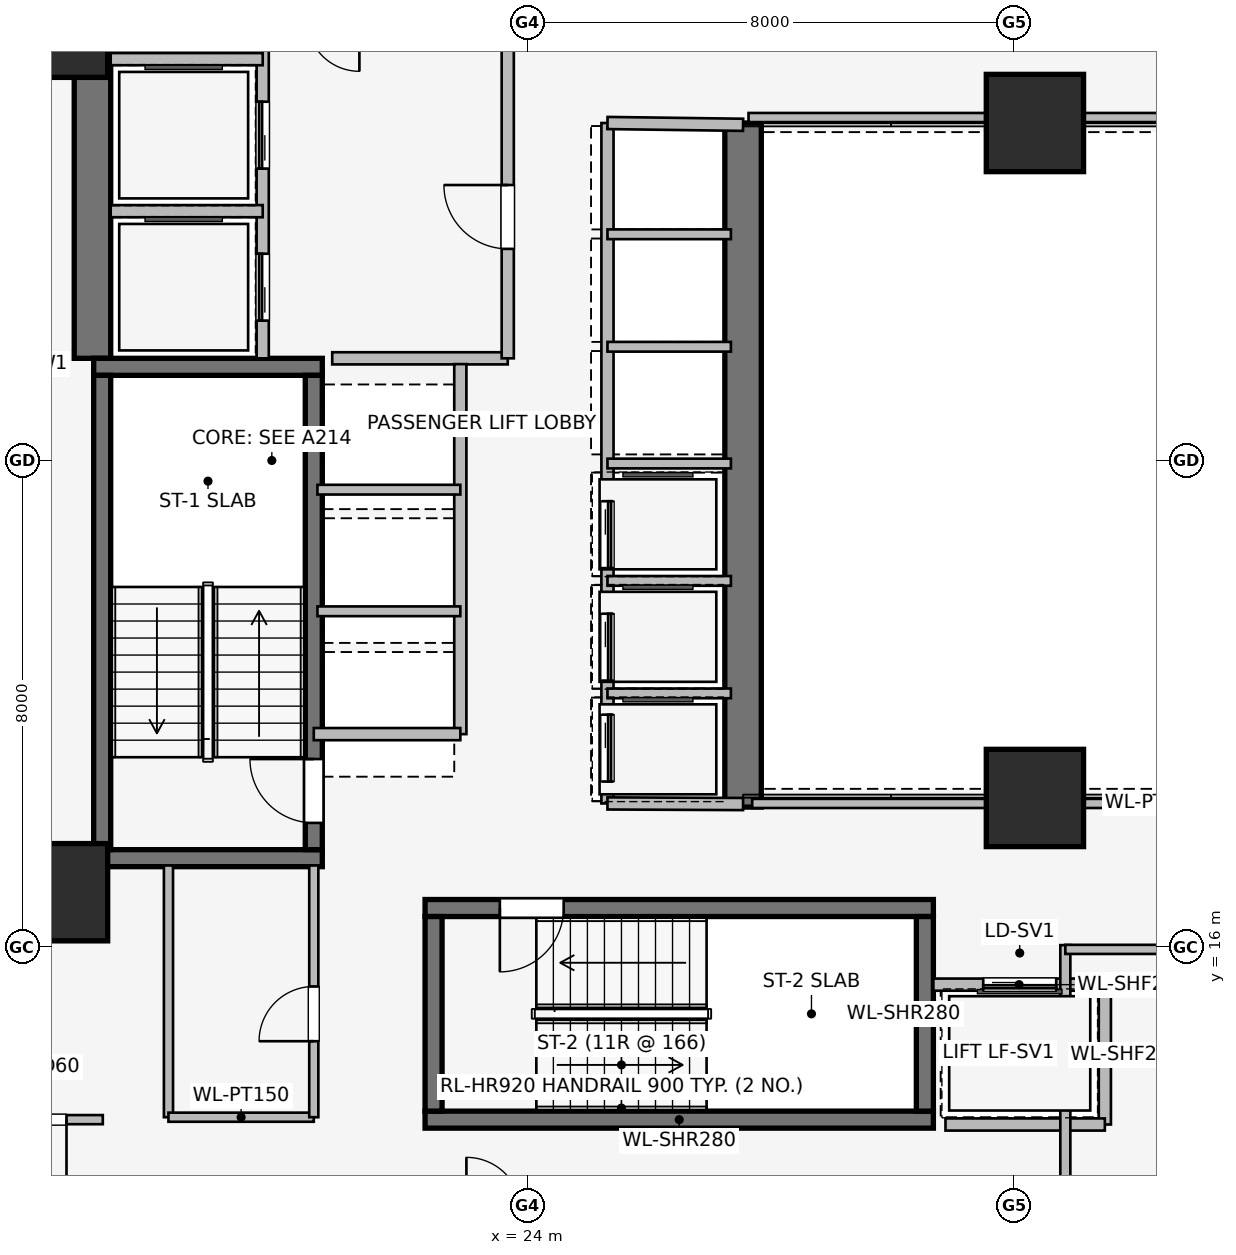
"""IFC4 building model, lengths in metres.
Left out: names, types, materials, properties, quantities, classifications, styles, units other than length and angle.
Written with IfcOpenShell. Run it as: python <this file> out.ifc"""

import sys

from ifc_helpers import new_model, si_unit, direction, frame, frame_2d, origin, origin_2d, place, context, subcontext, project, spatial, rectangle, extrude, element, fill, save


model = new_model("IFC4")
c1 = context("Model", 3, precision=1e-05, world=origin(), true_north=direction((0.0, 1.0)))
c2 = subcontext(c1, "Body", "Model", "MODEL_VIEW")
j1 = project(units=[si_unit("LENGTHUNIT", "METRE"), si_unit("PLANEANGLEUNIT", "RADIAN")], contexts=[c1])
p1 = place(None, origin())
s1 = spatial("IfcSite", under=j1, at=p1, CompositionType="ELEMENT")
p2 = place(p1, origin())
s2 = spatial("IfcBuilding", under=s1, at=p2, CompositionType="ELEMENT")
p3 = place(p2, frame((0.0, 0.0, 48.9)))
s3 = spatial("IfcBuildingStorey", under=s2, at=p3, CompositionType="ELEMENT", Elevation=48.9)
p4 = place(p3, frame((16.85, 25.68, 0.0), z_axis=(0.0, 0.0, 1.0), x_axis=(0.0, 1.0, 0.0)))
e1 = element("IfcWall", 1, at=p4, inside=s3, PredefinedType="SHEAR", context=c2, shape_type="SweptSolid", body=[
    extrude(rectangle(XDim=5.62, YDim=0.6, at=frame_2d((2.81, 0.0))), origin(), (0.0, 0.0, 1.0), 3.65),
])
p5 = place(p3, frame((27.55, 29.55, 0.0), z_axis=(0.0, 0.0, 1.0), x_axis=(0.0, -1.0, 0.0)))
e2 = element("IfcWall", 2, at=p5, inside=s3, PredefinedType="SHEAR", context=c2, shape_type="SweptSolid", body=[
    extrude(rectangle(XDim=11.25, YDim=0.6, at=frame_2d((5.625, 0.0))), origin(), (0.0, 0.0, 1.0), 3.65),
])
for number, where, z_axis, x_axis in (
    (3, (16.87, 17.46, 0.0), (0.0, 0.0, 1.0), (1.0, 0.0, 0.0)),
    (4, (20.63, 25.54, 0.0), (0.0, 0.0, 1.0), (-1.0, 0.0, 0.0)),
):
    element("IfcWall", number, at=place(p3, frame(where, z_axis=z_axis, x_axis=x_axis)), inside=s3, PredefinedType="SHEAR", context=c2, shape_type="SweptSolid", body=[
        extrude(rectangle(XDim=3.76, YDim=0.28, at=frame_2d((1.88, 0.0))), origin(), (0.0, 0.0, 1.0), 3.65),
    ])
p6 = place(p3, frame((17.01, 25.4, 0.0), z_axis=(0.0, 0.0, 1.0), x_axis=(0.0, -1.0, 0.0)))
e5 = element("IfcWall", 5, at=p6, inside=s3, PredefinedType="SHEAR", context=c2, shape_type="SweptSolid", body=[
    extrude(rectangle(XDim=7.8, YDim=0.28, at=frame_2d((3.9, 0.0))), origin(), (0.0, 0.0, 1.0), 3.65),
])
p7 = place(p3, frame((20.49, 17.6, 0.0), z_axis=(0.0, 0.0, 1.0), x_axis=(0.0, 1.0, 0.0)))
e6 = element("IfcWall", 6, at=p7, inside=s3, PredefinedType="SHEAR", context=c2, shape_type="SweptSolid", body=[
    extrude(rectangle(XDim=7.8, YDim=0.28, at=frame_2d((3.9, 0.0))), origin(), (0.0, 0.0, 1.0), 3.65),
])
p8 = place(p7, frame((0.44, 0.0, 0.0)))
e7 = element("IfcOpeningElement", 7, at=p8, cuts=e6, PredefinedType="OPENING", context=c2, shape_type="SweptSolid", body=[
    extrude(rectangle(XDim=1.05, YDim=2.0, at=frame_2d((0.525, 1.0))), frame((0.0, 0.15, 0.0), z_axis=(0.0, -1.0, 0.0), x_axis=(1.0, 0.0, 0.0)), (0.0, 0.0, 1.0), 0.3),
])
p9 = place(p3, frame((22.32, 13.16, 0.0), z_axis=(0.0, 0.0, 1.0), x_axis=(1.0, 0.0, 0.0)))
e8 = element("IfcWall", 8, at=p9, inside=s3, PredefinedType="SHEAR", context=c2, shape_type="SweptSolid", body=[
    extrude(rectangle(XDim=8.36, YDim=0.28, at=frame_2d((4.18, 0.0))), origin(), (0.0, 0.0, 1.0), 3.65),
])
p10 = place(p3, frame((30.68, 16.64, 0.0), z_axis=(0.0, 0.0, 1.0), x_axis=(-1.0, 0.0, 0.0)))
e9 = element("IfcWall", 9, at=p10, inside=s3, PredefinedType="SHEAR", context=c2, shape_type="SweptSolid", body=[
    extrude(rectangle(XDim=8.36, YDim=0.28, at=frame_2d((4.18, 0.0))), origin(), (0.0, 0.0, 1.0), 3.65),
])
p11 = place(p10, frame((6.08, 0.0, 0.0)))
e10 = element("IfcOpeningElement", 10, at=p11, cuts=e9, PredefinedType="OPENING", context=c2, shape_type="SweptSolid", body=[
    extrude(rectangle(XDim=1.05, YDim=2.0, at=frame_2d((0.525, 1.0))), frame((0.0, 0.15, 0.0), z_axis=(0.0, -1.0, 0.0), x_axis=(1.0, 0.0, 0.0)), (0.0, 0.0, 1.0), 0.3),
])
for number, where, z_axis, x_axis in (
    (11, (22.46, 16.5, 0.0), (0.0, 0.0, 1.0), (0.0, -1.0, 0.0)),
    (12, (30.54, 13.3, 0.0), (0.0, 0.0, 1.0), (0.0, 1.0, 0.0)),
):
    element("IfcWall", number, at=place(p3, frame(where, z_axis=z_axis, x_axis=x_axis)), inside=s3, PredefinedType="SHEAR", context=c2, shape_type="SweptSolid", body=[
        extrude(rectangle(XDim=3.2, YDim=0.28, at=frame_2d((1.6, 0.0))), origin(), (0.0, 0.0, 1.0), 3.65),
    ])
for number, where, z_axis, x_axis in (
    (13, (16.3, 16.9, 0.0), (0.0, 0.0, 1.0), (1.0, 0.0, 0.0)),
    (14, (16.3, 31.1, 0.0), (0.0, 0.0, 1.0), (1.0, 0.0, 0.0)),
    (15, (32.35, 18.45, 0.0), (0.0, 0.0, 1.0), (1.0, 0.0, 0.0)),
    (16, (32.35, 29.55, 0.0), (0.0, 0.0, 1.0), (1.0, 0.0, 0.0)),
):
    element("IfcColumn", number, at=place(p3, frame(where, z_axis=z_axis, x_axis=x_axis)), inside=s3, PredefinedType="COLUMN", context=c2, shape_type="SweptSolid", body=[
        extrude(rectangle(XDim=1.6, YDim=1.6, at=origin_2d()), origin(), (0.0, 0.0, 1.0), 3.65),
    ])
p12 = place(p3, frame((16.998, 11.099, 0.0), z_axis=(0.0, 0.0, 1.0), x_axis=(-0.790691856293, 0.61221433207, 0.0)))
e17 = element("IfcWall", 17, at=p12, inside=s3, PredefinedType="STANDARD", context=c2, shape_type="SweptSolid", body=[
    extrude(rectangle(XDim=1.676, YDim=0.33, at=frame_2d((0.838, 0.0))), origin(), (0.0, 0.0, 1.0), 3.36),
])
p13 = place(p3, frame((19.65, 25.68, 0.0), z_axis=(0.0, 0.0, 1.0), x_axis=(0.0, 1.0, 0.0)))
e18 = element("IfcWall", 18, at=p13, inside=s3, PredefinedType="PARTITIONING", context=c2, shape_type="SweptSolid", body=[
    extrude(rectangle(XDim=5.54, YDim=0.2, at=frame_2d((2.77, 0.0))), origin(), (0.0, 0.0, 1.0), 3.36),
])
p14 = place(p13, frame((0.62, 0.0, 0.0)))
e19 = element("IfcOpeningElement", 19, at=p14, cuts=e18, PredefinedType="OPENING", context=c2, shape_type="SweptSolid", body=[
    extrude(rectangle(XDim=1.1, YDim=2.2, at=frame_2d((0.55, 1.1))), frame((0.0, 0.11, 0.0), z_axis=(0.0, -1.0, 0.0), x_axis=(1.0, 0.0, 0.0)), (0.0, 0.0, 1.0), 0.22),
])
p15 = place(p13, frame((3.12, 0.0, 0.0)))
e20 = element("IfcOpeningElement", 20, at=p15, cuts=e18, PredefinedType="OPENING", context=c2, shape_type="SweptSolid", body=[
    extrude(rectangle(XDim=1.1, YDim=2.2, at=frame_2d((0.55, 1.1))), frame((0.0, 0.11, 0.0), z_axis=(0.0, -1.0, 0.0), x_axis=(1.0, 0.0, 0.0)), (0.0, 0.0, 1.0), 0.22),
])
p16 = place(p3, frame((20.793, 25.68, 0.0), z_axis=(0.0, 0.0, 1.0), x_axis=(1.0, 0.0, 0.0)))
e21 = element("IfcWall", 21, at=p16, inside=s3, PredefinedType="PARTITIONING", context=c2, shape_type="SweptSolid", body=[
    extrude(rectangle(XDim=2.887, YDim=0.2, at=frame_2d((1.443, 0.0))), origin(), (0.0, 0.0, 1.0), 3.36),
])
p17 = place(p3, frame((23.68, 25.68, 0.0), z_axis=(0.0, 0.0, 1.0), x_axis=(0.0, 1.0, 0.0)))
e22 = element("IfcWall", 22, at=p17, inside=s3, PredefinedType="PARTITIONING", context=c2, shape_type="SweptSolid", body=[
    extrude(rectangle(XDim=5.54, YDim=0.2, at=frame_2d((2.77, 0.0))), origin(), (0.0, 0.0, 1.0), 3.36),
])
p18 = place(p17, frame((1.8, 0.0, 0.0)))
e23 = element("IfcOpeningElement", 23, at=p18, cuts=e22, PredefinedType="OPENING", context=c2, shape_type="SweptSolid", body=[
    extrude(rectangle(XDim=1.05, YDim=2.0, at=frame_2d((0.525, 1.0))), frame((0.0, 0.11, 0.0), z_axis=(0.0, -1.0, 0.0), x_axis=(1.0, 0.0, 0.0)), (0.0, 0.0, 1.0), 0.22),
])
p19 = place(p3, frame((17.15, 28.1, 0.0), z_axis=(0.0, 0.0, 1.0), x_axis=(1.0, 0.0, 0.0)))
e24 = element("IfcWall", 24, at=p19, inside=s3, PredefinedType="PARTITIONING", context=c2, shape_type="SweptSolid", body=[
    extrude(rectangle(XDim=2.5, YDim=0.2, at=frame_2d((1.25, 0.0))), origin(), (0.0, 0.0, 1.0), 3.36),
])
p20 = place(p3, frame((19.65, 30.6, 0.0), z_axis=(0.0, 0.0, 1.0), x_axis=(-1.0, 0.0, 0.0)))
e25 = element("IfcWall", 25, at=p20, inside=s3, PredefinedType="PARTITIONING", context=c2, shape_type="SweptSolid", body=[
    extrude(rectangle(XDim=2.5, YDim=0.2, at=frame_2d((1.25, 0.0))), origin(), (0.0, 0.0, 1.0), 2.26),
])
p21 = place(p3, frame((33.5, 15.38, 0.0), z_axis=(0.0, 0.0, 1.0), x_axis=(-1.0, 0.0, 0.0)))
e26 = element("IfcWall", 26, at=p21, inside=s3, PredefinedType="PARTITIONING", context=c2, shape_type="SweptSolid", body=[
    extrude(rectangle(XDim=2.82, YDim=0.2, at=frame_2d((1.41, 0.0))), origin(), (0.0, 0.0, 1.0), 3.36),
])
p22 = place(p21, frame((0.8, 0.0, 0.0)))
e27 = element("IfcOpeningElement", 27, at=p22, cuts=e26, PredefinedType="OPENING", context=c2, shape_type="SweptSolid", body=[
    extrude(rectangle(XDim=1.2, YDim=2.2, at=frame_2d((0.6, 1.1))), frame((0.0, 0.11, 0.0), z_axis=(0.0, -1.0, 0.0), x_axis=(1.0, 0.0, 0.0)), (0.0, 0.0, 1.0), 0.22),
])
p23 = place(p3, frame((33.5, 13.08, 0.0), z_axis=(0.0, 0.0, 1.0), x_axis=(0.0, 1.0, 0.0)))
e28 = element("IfcWall", 28, at=p23, inside=s3, PredefinedType="PARTITIONING", context=c2, shape_type="SweptSolid", body=[
    extrude(rectangle(XDim=2.3, YDim=0.2, at=frame_2d((1.15, 0.0))), origin(), (0.0, 0.0, 1.0), 3.36),
])
p24 = place(p3, frame((30.879, 13.08, 0.0), z_axis=(0.0, 0.0, 1.0), x_axis=(1.0, 0.0, 0.0)))
e29 = element("IfcWall", 29, at=p24, inside=s3, PredefinedType="PARTITIONING", context=c2, shape_type="SweptSolid", body=[
    extrude(rectangle(XDim=2.621, YDim=0.2, at=frame_2d((1.311, 0.0))), origin(), (0.0, 0.0, 1.0), 3.36),
])
p25 = place(p3, frame((22.9, 19.5, 0.0), z_axis=(0.0, 0.0, 1.0), x_axis=(0.0, 1.0, 0.0)))
e30 = element("IfcWall", 30, at=p25, inside=s3, PredefinedType="PARTITIONING", context=c2, shape_type="SweptSolid", body=[
    extrude(rectangle(XDim=6.085, YDim=0.2, at=frame_2d((3.042, 0.0))), origin(), (0.0, 0.0, 1.0), 3.36),
])
p26 = place(p3, frame((20.49, 19.5, 0.0), z_axis=(0.0, 0.0, 1.0), x_axis=(1.0, 0.0, 0.0)))
e31 = element("IfcWall", 31, at=p26, inside=s3, PredefinedType="PARTITIONING", context=c2, shape_type="SweptSolid", body=[
    extrude(rectangle(XDim=2.41, YDim=0.2, at=frame_2d((1.205, 0.0))), origin(), (0.0, 0.0, 1.0), 2.26),
])
for number, where, z_axis, x_axis in (
    (32, (20.55, 21.52, 0.0), (0.0, 0.0, 1.0), (1.0, 0.0, 0.0)),
    (33, (20.55, 23.52, 0.0), (0.0, 0.0, 1.0), (1.0, 0.0, 0.0)),
):
    element("IfcWall", number, at=place(p3, frame(where, z_axis=z_axis, x_axis=x_axis)), inside=s3, PredefinedType="PARTITIONING", context=c2, shape_type="SweptSolid", body=[
        extrude(rectangle(XDim=2.35, YDim=0.16, at=frame_2d((1.175, 0.0))), origin(), (0.0, 0.0, 1.0), 3.36),
    ])
p27 = place(p3, frame((25.32, 29.55, 0.0), z_axis=(0.0, 0.0, 1.0), x_axis=(0.0, -1.0, 0.0)))
e34 = element("IfcWall", 34, at=p27, inside=s3, PredefinedType="PARTITIONING", context=c2, shape_type="SweptSolid", body=[
    extrude(rectangle(XDim=11.19, YDim=0.2, at=frame_2d((5.595, 0.0))), origin(), (0.0, 0.0, 1.0), 3.36),
])
p28 = place(p27, frame((6.22, 0.0, 0.0)))
e35 = element("IfcOpeningElement", 35, at=p28, cuts=e34, PredefinedType="OPENING", context=c2, shape_type="SweptSolid", body=[
    extrude(rectangle(XDim=1.1, YDim=2.2, at=frame_2d((0.55, 1.1))), frame((0.0, 0.11, 0.0), z_axis=(0.0, -1.0, 0.0), x_axis=(1.0, 0.0, 0.0)), (0.0, 0.0, 1.0), 0.22),
])
p29 = place(p27, frame((8.07, 0.0, 0.0)))
e36 = element("IfcOpeningElement", 36, at=p29, cuts=e34, PredefinedType="OPENING", context=c2, shape_type="SweptSolid", body=[
    extrude(rectangle(XDim=1.1, YDim=2.2, at=frame_2d((0.55, 1.1))), frame((0.0, 0.11, 0.0), z_axis=(0.0, -1.0, 0.0), x_axis=(1.0, 0.0, 0.0)), (0.0, 0.0, 1.0), 0.22),
])
p30 = place(p27, frame((9.73, 0.0, 0.0)))
e37 = element("IfcOpeningElement", 37, at=p30, cuts=e34, PredefinedType="OPENING", context=c2, shape_type="SweptSolid", body=[
    extrude(rectangle(XDim=1.1, YDim=2.2, at=frame_2d((0.55, 1.1))), frame((0.0, 0.11, 0.0), z_axis=(0.0, -1.0, 0.0), x_axis=(1.0, 0.0, 0.0)), (0.0, 0.0, 1.0), 0.22),
])
p31 = place(p3, frame((25.32, 18.36, 0.0), z_axis=(0.0, 0.0, 1.0), x_axis=(0.999989925833, -0.004488678231, 0.0)))
e38 = element("IfcWall", 38, at=p31, inside=s3, PredefinedType="PARTITIONING", context=c2, shape_type="SweptSolid", body=[
    extrude(rectangle(XDim=2.23, YDim=0.2, at=frame_2d((1.115, 0.0))), origin(), (0.0, 0.0, 1.0), 3.36),
])
p32 = place(p3, frame((27.55, 29.52, 0.0), z_axis=(0.0, 0.0, 1.0), x_axis=(-0.999909343457, 0.013464949556, 0.0)))
e39 = element("IfcWall", 39, at=p32, inside=s3, PredefinedType="PARTITIONING", context=c2, shape_type="SweptSolid", body=[
    extrude(rectangle(XDim=2.23, YDim=0.2, at=frame_2d((1.115, 0.0))), origin(), (0.0, 0.0, 1.0), 2.26),
])
for number, where, z_axis, x_axis in (
    (40, (25.32, 20.17, 0.0), (0.0, 0.0, 1.0), (1.0, 0.0, 0.0)),
    (41, (25.32, 22.02, 0.0), (0.0, 0.0, 1.0), (1.0, 0.0, 0.0)),
    (42, (25.32, 23.95, 0.0), (0.0, 0.0, 1.0), (1.0, 0.0, 0.0)),
    (43, (25.32, 25.87, 0.0), (0.0, 0.0, 1.0), (1.0, 0.0, 0.0)),
    (44, (25.32, 27.72, 0.0), (0.0, 0.0, 1.0), (1.0, 0.0, 0.0)),
):
    element("IfcWall", number, at=place(p3, frame(where, z_axis=z_axis, x_axis=x_axis)), inside=s3, PredefinedType="PARTITIONING", context=c2, shape_type="SweptSolid", body=[
        extrude(rectangle(XDim=2.03, YDim=0.16, at=frame_2d((1.015, 0.0))), origin(), (0.0, 0.0, 1.0), 3.36),
    ])
p33 = place(p3, frame((18.1, 17.34, 0.0), z_axis=(0.0, 0.0, 1.0), x_axis=(0.0, -1.0, 0.0)))
e45 = element("IfcWall", 45, at=p33, inside=s3, PredefinedType="PARTITIONING", context=c2, shape_type="SweptSolid", body=[
    extrude(rectangle(XDim=4.14, YDim=0.15, at=frame_2d((2.07, 0.0))), origin(), (0.0, 0.0, 1.0), 3.36),
])
p34 = place(p3, frame((18.1, 13.2, 0.0), z_axis=(0.0, 0.0, 1.0), x_axis=(1.0, 0.0, 0.0)))
e46 = element("IfcWall", 46, at=p34, inside=s3, PredefinedType="PARTITIONING", context=c2, shape_type="SweptSolid", body=[
    extrude(rectangle(XDim=2.39, YDim=0.15, at=frame_2d((1.195, 0.0))), origin(), (0.0, 0.0, 1.0), 3.36),
])
p35 = place(p3, frame((20.49, 13.2, 0.0), z_axis=(0.0, 0.0, 1.0), x_axis=(0.0, 1.0, 0.0)))
e47 = element("IfcWall", 47, at=p35, inside=s3, PredefinedType="PARTITIONING", context=c2, shape_type="SweptSolid", body=[
    extrude(rectangle(XDim=4.14, YDim=0.15, at=frame_2d((2.07, 0.0))), origin(), (0.0, 0.0, 1.0), 3.36),
])
p36 = place(p35, frame((1.25, 0.0, 0.0)))
e48 = element("IfcOpeningElement", 48, at=p36, cuts=e47, PredefinedType="OPENING", context=c2, shape_type="SweptSolid", body=[
    extrude(rectangle(XDim=0.9, YDim=2.0, at=frame_2d((0.45, 1.0))), frame((0.0, 0.085, 0.0), z_axis=(0.0, -1.0, 0.0), x_axis=(1.0, 0.0, 0.0)), (0.0, 0.0, 1.0), 0.17),
])
p37 = place(p3, frame((27.7, 18.36, 0.0), z_axis=(0.0, 0.0, 1.0), x_axis=(1.0, 0.0, 0.0)))
e49 = element("IfcWall", 49, at=p37, inside=s3, PredefinedType="PARTITIONING", context=c2, shape_type="SweptSolid", body=[
    extrude(rectangle(XDim=12.14, YDim=0.15, at=frame_2d((6.07, 0.0))), origin(), (0.0, 0.0, 1.0), 2.501),
])
p38 = place(p3, frame((39.84, 29.64, 0.0), z_axis=(0.0, 0.0, 1.0), x_axis=(-1.0, 0.0, 0.0)))
e50 = element("IfcWall", 50, at=p38, inside=s3, PredefinedType="PARTITIONING", context=c2, shape_type="SweptSolid", body=[
    extrude(rectangle(XDim=12.2, YDim=0.15, at=frame_2d((6.1, 0.0))), origin(), (0.0, 0.0, 1.0), 2.501),
])
p39 = place(p3, frame((32.85, 3.064, 0.0), z_axis=(0.0, 0.0, 1.0), x_axis=(0.0, 1.0, 0.0)))
e51 = element("IfcWall", 51, at=p39, inside=s3, PredefinedType="PARTITIONING", context=c2, shape_type="SweptSolid", body=[
    extrude(rectangle(XDim=12.966, YDim=0.165, at=frame_2d((6.483, 0.0))), origin(), (0.0, 0.0, 1.0), 3.36),
])
p40 = place(p3, frame((17.02, 13.16, 0.0), z_axis=(0.0, 0.0, 1.0), x_axis=(-1.0, 0.0, 0.0)))
e52 = element("IfcWall", 52, at=p40, inside=s3, PredefinedType="PARTITIONING", context=c2, shape_type="SweptSolid", body=[
    extrude(rectangle(XDim=2.12, YDim=0.15, at=frame_2d((1.06, 0.0))), origin(), (0.0, 0.0, 1.0), 3.36),
])
p41 = place(p40, frame((0.597, 0.0, 0.0)))
e53 = element("IfcOpeningElement", 53, at=p41, cuts=e52, PredefinedType="OPENING", context=c2, shape_type="SweptSolid", body=[
    extrude(rectangle(XDim=0.96, YDim=2.0, at=frame_2d((0.48, 1.0))), frame((0.0, 0.085, 0.0), z_axis=(0.0, -1.0, 0.0), x_axis=(1.0, 0.0, 0.0)), (0.0, 0.0, 1.0), 0.17),
])
p42 = place(p3, frame((32.85, 15.96, 0.0), z_axis=(0.0, 0.0, 1.0), x_axis=(1.0, 0.0, 0.0)))
e54 = element("IfcWall", 54, at=p42, inside=s3, PredefinedType="PARTITIONING", context=c2, shape_type="SweptSolid", body=[
    extrude(rectangle(XDim=8.706, YDim=0.15, at=frame_2d((4.353, 0.0))), origin(), (0.0, 0.0, 1.0), 3.36),
])
p43 = place(p42, frame((3.873, 0.0, 0.0)))
e55 = element("IfcOpeningElement", 55, at=p43, cuts=e54, PredefinedType="OPENING", context=c2, shape_type="SweptSolid", body=[
    extrude(rectangle(XDim=0.96, YDim=2.0, at=frame_2d((0.48, 1.0))), frame((0.0, 0.085, 0.0), z_axis=(0.0, -1.0, 0.0), x_axis=(1.0, 0.0, 0.0)), (0.0, 0.0, 1.0), 0.17),
])
p44 = place(p8, origin())
e56 = element("IfcDoor", 56, at=p44, inside=s3, OperationType="SINGLE_SWING_RIGHT", PredefinedType="DOOR", context=c2, shape_type="SweptSolid", body=[
    extrude(rectangle(XDim=1.05, YDim=2.0, at=frame_2d((0.525, 1.0))), frame((0.0, 0.025, 0.0), z_axis=(0.0, -1.0, 0.0), x_axis=(1.0, 0.0, 0.0)), (0.0, 0.0, 1.0), 0.05),
])
fill(e7, e56)
p45 = place(p11, origin())
e57 = element("IfcDoor", 57, at=p45, inside=s3, OperationType="SINGLE_SWING_RIGHT", PredefinedType="DOOR", context=c2, shape_type="SweptSolid", body=[
    extrude(rectangle(XDim=1.05, YDim=2.0, at=frame_2d((0.525, 1.0))), frame((0.0, 0.025, 0.0), z_axis=(0.0, -1.0, 0.0), x_axis=(1.0, 0.0, 0.0)), (0.0, 0.0, 1.0), 0.05),
])
fill(e10, e57)
p46 = place(p14, origin())
e58 = element("IfcDoor", 58, at=p46, inside=s3, OperationType="SLIDING_TO_LEFT", PredefinedType="DOOR", context=c2, shape_type="SweptSolid", body=[
    extrude(rectangle(XDim=1.1, YDim=2.2, at=frame_2d((0.55, 1.1))), frame((0.0, 0.025, 0.0), z_axis=(0.0, -1.0, 0.0), x_axis=(1.0, 0.0, 0.0)), (0.0, 0.0, 1.0), 0.05),
])
fill(e19, e58)
p47 = place(p15, origin())
e59 = element("IfcDoor", 59, at=p47, inside=s3, OperationType="SLIDING_TO_LEFT", PredefinedType="DOOR", context=c2, shape_type="SweptSolid", body=[
    extrude(rectangle(XDim=1.1, YDim=2.2, at=frame_2d((0.55, 1.1))), frame((0.0, 0.025, 0.0), z_axis=(0.0, -1.0, 0.0), x_axis=(1.0, 0.0, 0.0)), (0.0, 0.0, 1.0), 0.05),
])
fill(e20, e59)
p48 = place(p18, origin())
e60 = element("IfcDoor", 60, at=p48, inside=s3, OperationType="SINGLE_SWING_RIGHT", PredefinedType="DOOR", context=c2, shape_type="SweptSolid", body=[
    extrude(rectangle(XDim=1.05, YDim=2.0, at=frame_2d((0.525, 1.0))), frame((0.0, 0.025, 0.0), z_axis=(0.0, -1.0, 0.0), x_axis=(1.0, 0.0, 0.0)), (0.0, 0.0, 1.0), 0.05),
])
fill(e23, e60)
p49 = place(p22, origin())
e61 = element("IfcDoor", 61, at=p49, inside=s3, OperationType="SLIDING_TO_RIGHT", PredefinedType="DOOR", context=c2, shape_type="SweptSolid", body=[
    extrude(rectangle(XDim=1.2, YDim=2.2, at=frame_2d((0.6, 1.1))), frame((0.0, 0.025, 0.0), z_axis=(0.0, -1.0, 0.0), x_axis=(1.0, 0.0, 0.0)), (0.0, 0.0, 1.0), 0.05),
])
fill(e27, e61)
p50 = place(p28, origin())
e62 = element("IfcDoor", 62, at=p50, inside=s3, OperationType="SLIDING_TO_LEFT", PredefinedType="DOOR", context=c2, shape_type="SweptSolid", body=[
    extrude(rectangle(XDim=1.1, YDim=2.2, at=frame_2d((0.55, 1.1))), frame((0.0, 0.025, 0.0), z_axis=(0.0, -1.0, 0.0), x_axis=(1.0, 0.0, 0.0)), (0.0, 0.0, 1.0), 0.05),
])
fill(e35, e62)
p51 = place(p29, origin())
e63 = element("IfcDoor", 63, at=p51, inside=s3, OperationType="SLIDING_TO_LEFT", PredefinedType="DOOR", context=c2, shape_type="SweptSolid", body=[
    extrude(rectangle(XDim=1.1, YDim=2.2, at=frame_2d((0.55, 1.1))), frame((0.0, 0.025, 0.0), z_axis=(0.0, -1.0, 0.0), x_axis=(1.0, 0.0, 0.0)), (0.0, 0.0, 1.0), 0.05),
])
fill(e36, e63)
p52 = place(p30, origin())
e64 = element("IfcDoor", 64, at=p52, inside=s3, OperationType="SLIDING_TO_LEFT", PredefinedType="DOOR", context=c2, shape_type="SweptSolid", body=[
    extrude(rectangle(XDim=1.1, YDim=2.2, at=frame_2d((0.55, 1.1))), frame((0.0, 0.025, 0.0), z_axis=(0.0, -1.0, 0.0), x_axis=(1.0, 0.0, 0.0)), (0.0, 0.0, 1.0), 0.05),
])
fill(e37, e64)
p53 = place(p36, origin())
e65 = element("IfcDoor", 65, at=p53, inside=s3, OperationType="SINGLE_SWING_LEFT", PredefinedType="DOOR", context=c2, shape_type="SweptSolid", body=[
    extrude(rectangle(XDim=0.9, YDim=2.0, at=frame_2d((0.45, 1.0))), frame((0.0, 0.025, 0.0), z_axis=(0.0, -1.0, 0.0), x_axis=(1.0, 0.0, 0.0)), (0.0, 0.0, 1.0), 0.05),
])
fill(e48, e65)
p54 = place(p41, origin())
e66 = element("IfcDoor", 66, at=p54, inside=s3, OperationType="SINGLE_SWING_LEFT", PredefinedType="DOOR", context=c2, shape_type="SweptSolid", body=[
    extrude(rectangle(XDim=0.96, YDim=2.0, at=frame_2d((0.48, 1.0))), frame((0.0, 0.025, 0.0), z_axis=(0.0, -1.0, 0.0), x_axis=(1.0, 0.0, 0.0)), (0.0, 0.0, 1.0), 0.05),
])
fill(e53, e66)
save(model, sys.argv[1])
